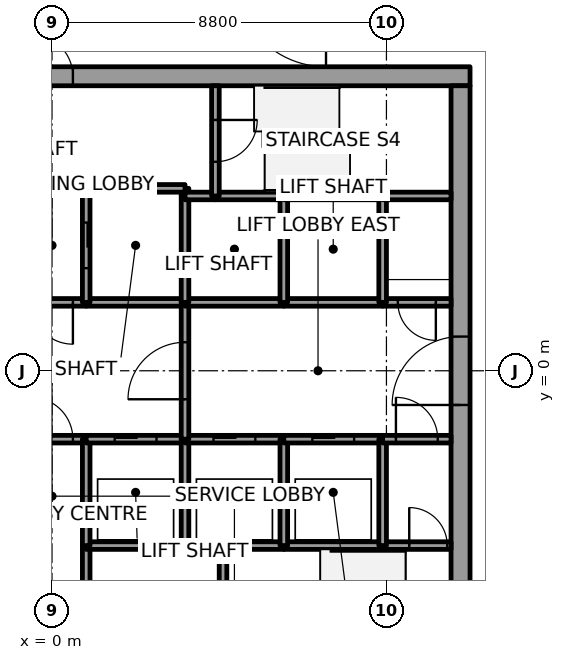
"""IFC4 building model, lengths in metres.
Left out: names, types, materials, properties, quantities, classifications, styles, units other than length and angle.
Written with IfcOpenShell. Run it as: python <this file> out.ifc"""

import sys

from ifc_helpers import new_model, si_unit, direction, frame, frame_2d, origin, place, context, subcontext, project, spatial, rectangle, extrude, element, fill, save


model = new_model("IFC4")
c1 = context("Model", 3, precision=1e-05, world=origin(), true_north=direction((0.0, 1.0)))
c2 = subcontext(c1, "Body", "Model", "MODEL_VIEW")
j1 = project(units=[si_unit("LENGTHUNIT", "METRE"), si_unit("PLANEANGLEUNIT", "RADIAN")], contexts=[c1])
p1 = place(None, origin())
s1 = spatial("IfcSite", under=j1, at=p1, CompositionType="ELEMENT")
p2 = place(p1, origin())
s2 = spatial("IfcBuilding", under=s1, at=p2, CompositionType="ELEMENT")
p3 = place(p2, frame((0.0, 0.0, 107.2)))
s3 = spatial("IfcBuildingStorey", under=s2, at=p3, CompositionType="ELEMENT", Elevation=107.2)
p4 = place(p3, frame((-11.0, 7.75, 0.0), z_axis=(0.0, 0.0, 1.0), x_axis=(1.0, 0.0, 0.0)))
e1 = element("IfcWall", 1, at=p4, inside=s3, PredefinedType="SHEAR", context=c2, shape_type="SweptSolid", body=[
    extrude(rectangle(XDim=22.0, YDim=0.5, at=frame_2d((11.0, 0.0))), origin(), (0.0, 0.0, 1.0), 5.4),
])
p5 = place(p4, frame((10.45, 0.0, 0.0)))
e2 = element("IfcOpeningElement", 2, at=p5, cuts=e1, PredefinedType="OPENING", context=c2, shape_type="SweptSolid", body=[
    extrude(rectangle(XDim=1.1, YDim=2.1, at=frame_2d((0.55, 1.05))), frame((0.0, 0.25, 0.0), z_axis=(0.0, -1.0, 0.0), x_axis=(1.0, 0.0, 0.0)), (0.0, 0.0, 1.0), 0.5),
])
p6 = place(p3, frame((10.75, -7.5, 0.0), z_axis=(0.0, 0.0, 1.0), x_axis=(0.0, 1.0, 0.0)))
e3 = element("IfcWall", 3, at=p6, inside=s3, PredefinedType="SHEAR", context=c2, shape_type="SweptSolid", body=[
    extrude(rectangle(XDim=15.0, YDim=0.5, at=frame_2d((7.5, 0.0))), origin(), (0.0, 0.0, 1.0), 5.4),
])
p7 = place(p6, frame((6.6, 0.0, 0.0)))
e4 = element("IfcOpeningElement", 4, at=p7, cuts=e3, PredefinedType="OPENING", context=c2, shape_type="SweptSolid", body=[
    extrude(rectangle(XDim=1.8, YDim=2.1, at=frame_2d((0.9, 1.05))), frame((0.0, 0.25, 0.0), z_axis=(0.0, -1.0, 0.0), x_axis=(1.0, 0.0, 0.0)), (0.0, 0.0, 1.0), 0.5),
])
p8 = place(p3, frame((-0.9, -1.8, 0.0), z_axis=(0.0, 0.0, 1.0), x_axis=(1.0, 0.0, 0.0)))
e5 = element("IfcWall", 5, at=p8, inside=s3, PredefinedType="SOLIDWALL", context=c2, shape_type="SweptSolid", body=[
    extrude(rectangle(XDim=1.8, YDim=0.2, at=frame_2d((0.9, 0.0))), origin(), (0.0, 0.0, 1.0), 5.25),
])
p9 = place(p8, frame((0.35, 0.0, 0.0)))
e6 = element("IfcOpeningElement", 6, at=p9, cuts=e5, PredefinedType="OPENING", context=c2, shape_type="SweptSolid", body=[
    extrude(rectangle(XDim=1.1, YDim=2.1, at=frame_2d((0.55, 1.05))), frame((0.0, 0.1, 0.0), z_axis=(0.0, -1.0, 0.0), x_axis=(1.0, 0.0, 0.0)), (0.0, 0.0, 1.0), 0.2),
])
p10 = place(p3, frame((0.9, 1.8, 0.0), z_axis=(0.0, 0.0, 1.0), x_axis=(-1.0, 0.0, 0.0)))
e7 = element("IfcWall", 7, at=p10, inside=s3, PredefinedType="SOLIDWALL", context=c2, shape_type="SweptSolid", body=[
    extrude(rectangle(XDim=1.8, YDim=0.2, at=frame_2d((0.9, 0.0))), origin(), (0.0, 0.0, 1.0), 5.25),
])
p11 = place(p10, frame((0.35, 0.0, 0.0)))
e8 = element("IfcOpeningElement", 8, at=p11, cuts=e7, PredefinedType="OPENING", context=c2, shape_type="SweptSolid", body=[
    extrude(rectangle(XDim=1.1, YDim=2.1, at=frame_2d((0.55, 1.05))), frame((0.0, 0.1, 0.0), z_axis=(0.0, -1.0, 0.0), x_axis=(1.0, 0.0, 0.0)), (0.0, 0.0, 1.0), 0.2),
])
p12 = place(p3, frame((0.9, -4.6, 0.0), z_axis=(0.0, 0.0, 1.0), x_axis=(0.0, -1.0, 0.0)))
e9 = element("IfcWall", 9, at=p12, inside=s3, PredefinedType="SOLIDWALL", context=c2, shape_type="SweptSolid", body=[
    extrude(rectangle(XDim=2.9, YDim=0.2, at=frame_2d((1.45, 0.0))), origin(), (0.0, 0.0, 1.0), 5.25),
])
p13 = place(p12, frame((1.0, 0.0, 0.0)))
e10 = element("IfcOpeningElement", 10, at=p13, cuts=e9, PredefinedType="OPENING", context=c2, shape_type="SweptSolid", body=[
    extrude(rectangle(XDim=0.9, YDim=2.1, at=frame_2d((0.45, 1.05))), frame((0.0, 0.1, 0.0), z_axis=(0.0, -1.0, 0.0), x_axis=(1.0, 0.0, 0.0)), (0.0, 0.0, 1.0), 0.2),
])
p14 = place(p3, frame((3.5, -4.6, 0.0), z_axis=(0.0, 0.0, 1.0), x_axis=(-1.0, 0.0, 0.0)))
e11 = element("IfcWall", 11, at=p14, inside=s3, PredefinedType="SOLIDWALL", context=c2, shape_type="SweptSolid", body=[
    extrude(rectangle(XDim=2.6, YDim=0.2, at=frame_2d((1.3, 0.0))), origin(), (0.0, 0.0, 1.0), 5.25),
])
p15 = place(p3, frame((0.9, -1.8, 0.0), z_axis=(0.0, 0.0, 1.0), x_axis=(0.0, -1.0, 0.0)))
e12 = element("IfcWall", 12, at=p15, inside=s3, PredefinedType="SOLIDWALL", context=c2, shape_type="SweptSolid", body=[
    extrude(rectangle(XDim=2.8, YDim=0.2, at=frame_2d((1.4, 0.0))), origin(), (0.0, 0.0, 1.0), 5.25),
])
p16 = place(p3, frame((0.9, -1.8, 0.0), z_axis=(0.0, 0.0, 1.0), x_axis=(1.0, 0.0, 0.0)))
e13 = element("IfcWall", 13, at=p16, inside=s3, PredefinedType="SOLIDWALL", context=c2, shape_type="SweptSolid", body=[
    extrude(rectangle(XDim=2.6, YDim=0.2, at=frame_2d((1.3, 0.0))), origin(), (0.0, 0.0, 1.0), 5.25),
])
p17 = place(p16, frame((0.75, 0.0, 0.0)))
e14 = element("IfcOpeningElement", 14, at=p17, cuts=e13, PredefinedType="OPENING", context=c2, shape_type="SweptSolid", body=[
    extrude(rectangle(XDim=1.1, YDim=2.1, at=frame_2d((0.55, 1.05))), frame((0.0, 0.1, 0.0), z_axis=(0.0, -1.0, 0.0), x_axis=(1.0, 0.0, 0.0)), (0.0, 0.0, 1.0), 0.2),
])
p18 = place(p3, frame((3.5, 1.8, 0.0), z_axis=(0.0, 0.0, 1.0), x_axis=(-1.0, 0.0, 0.0)))
e15 = element("IfcWall", 15, at=p18, inside=s3, PredefinedType="SOLIDWALL", context=c2, shape_type="SweptSolid", body=[
    extrude(rectangle(XDim=2.6, YDim=0.2, at=frame_2d((1.3, 0.0))), origin(), (0.0, 0.0, 1.0), 5.25),
])
p19 = place(p3, frame((3.5, 4.6, 0.0), z_axis=(0.0, 0.0, 1.0), x_axis=(0.0, 1.0, 0.0)))
e16 = element("IfcWall", 16, at=p19, inside=s3, PredefinedType="SOLIDWALL", context=c2, shape_type="SweptSolid", body=[
    extrude(rectangle(XDim=0.2, YDim=0.2, at=frame_2d((0.1, 0.0))), origin(), (0.0, 0.0, 1.0), 5.25),
])
p20 = place(p3, frame((3.5, 4.8, 0.0), z_axis=(0.0, 0.0, 1.0), x_axis=(-1.0, 0.0, 0.0)))
e17 = element("IfcWall", 17, at=p20, inside=s3, PredefinedType="SOLIDWALL", context=c2, shape_type="SweptSolid", body=[
    extrude(rectangle(XDim=2.6, YDim=0.2, at=frame_2d((1.3, 0.0))), origin(), (0.0, 0.0, 1.0), 5.25),
])
p21 = place(p3, frame((0.9, 4.8, 0.0), z_axis=(0.0, 0.0, 1.0), x_axis=(0.0, -1.0, 0.0)))
e18 = element("IfcWall", 18, at=p21, inside=s3, PredefinedType="SOLIDWALL", context=c2, shape_type="SweptSolid", body=[
    extrude(rectangle(XDim=3.0, YDim=0.2, at=frame_2d((1.5, 0.0))), origin(), (0.0, 0.0, 1.0), 5.25),
])
p22 = place(p21, frame((0.9, 0.0, 0.0)))
e19 = element("IfcOpeningElement", 19, at=p22, cuts=e18, PredefinedType="OPENING", context=c2, shape_type="SweptSolid", body=[
    extrude(rectangle(XDim=1.2, YDim=2.1, at=frame_2d((0.6, 1.05))), frame((0.0, 0.1, 0.0), z_axis=(0.0, -1.0, 0.0), x_axis=(1.0, 0.0, 0.0)), (0.0, 0.0, 1.0), 0.2),
])
p23 = place(p3, frame((4.5, -4.6, 0.0), z_axis=(0.0, 0.0, 1.0), x_axis=(-1.0, 0.0, 0.0)))
e20 = element("IfcWall", 20, at=p23, inside=s3, PredefinedType="SOLIDWALL", context=c2, shape_type="SweptSolid", body=[
    extrude(rectangle(XDim=1.0, YDim=0.2, at=frame_2d((0.5, 0.0))), origin(), (0.0, 0.0, 1.0), 5.25),
])
p24 = place(p3, frame((3.5, -4.6, 0.0), z_axis=(0.0, 0.0, 1.0), x_axis=(0.0, 1.0, 0.0)))
e21 = element("IfcWall", 21, at=p24, inside=s3, PredefinedType="SOLIDWALL", context=c2, shape_type="SweptSolid", body=[
    extrude(rectangle(XDim=2.8, YDim=0.2, at=frame_2d((1.4, 0.0))), origin(), (0.0, 0.0, 1.0), 5.25),
])
p25 = place(p3, frame((3.5, -1.8, 0.0), z_axis=(0.0, 0.0, 1.0), x_axis=(1.0, 0.0, 0.0)))
e22 = element("IfcWall", 22, at=p25, inside=s3, PredefinedType="SOLIDWALL", context=c2, shape_type="SweptSolid", body=[
    extrude(rectangle(XDim=2.6, YDim=0.2, at=frame_2d((1.3, 0.0))), origin(), (0.0, 0.0, 1.0), 5.25),
])
p26 = place(p25, frame((0.75, 0.0, 0.0)))
e23 = element("IfcOpeningElement", 23, at=p26, cuts=e22, PredefinedType="OPENING", context=c2, shape_type="SweptSolid", body=[
    extrude(rectangle(XDim=1.1, YDim=2.1, at=frame_2d((0.55, 1.05))), frame((0.0, 0.1, 0.0), z_axis=(0.0, -1.0, 0.0), x_axis=(1.0, 0.0, 0.0)), (0.0, 0.0, 1.0), 0.2),
])
p27 = place(p3, frame((3.5, -1.8, 0.0), z_axis=(0.0, 0.0, 1.0), x_axis=(0.0, 1.0, 0.0)))
e24 = element("IfcWall", 24, at=p27, inside=s3, PredefinedType="SOLIDWALL", context=c2, shape_type="SweptSolid", body=[
    extrude(rectangle(XDim=3.6, YDim=0.2, at=frame_2d((1.8, 0.0))), origin(), (0.0, 0.0, 1.0), 5.25),
])
p28 = place(p27, frame((1.05, 0.0, 0.0)))
e25 = element("IfcOpeningElement", 25, at=p28, cuts=e24, PredefinedType="OPENING", context=c2, shape_type="SweptSolid", body=[
    extrude(rectangle(XDim=1.5, YDim=2.1, at=frame_2d((0.75, 1.05))), frame((0.0, 0.1, 0.0), z_axis=(0.0, -1.0, 0.0), x_axis=(1.0, 0.0, 0.0)), (0.0, 0.0, 1.0), 0.2),
])
p29 = place(p3, frame((6.1, 1.8, 0.0), z_axis=(0.0, 0.0, 1.0), x_axis=(-1.0, 0.0, 0.0)))
e26 = element("IfcWall", 26, at=p29, inside=s3, PredefinedType="SOLIDWALL", context=c2, shape_type="SweptSolid", body=[
    extrude(rectangle(XDim=2.6, YDim=0.2, at=frame_2d((1.3, 0.0))), origin(), (0.0, 0.0, 1.0), 5.25),
])
p30 = place(p3, frame((3.5, 1.8, 0.0), z_axis=(0.0, 0.0, 1.0), x_axis=(0.0, 1.0, 0.0)))
e27 = element("IfcWall", 27, at=p30, inside=s3, PredefinedType="SOLIDWALL", context=c2, shape_type="SweptSolid", body=[
    extrude(rectangle(XDim=2.8, YDim=0.2, at=frame_2d((1.4, 0.0))), origin(), (0.0, 0.0, 1.0), 5.25),
])
p31 = place(p3, frame((4.3, 4.6, 0.0), z_axis=(0.0, 0.0, 1.0), x_axis=(-1.0, 0.0, 0.0)))
e28 = element("IfcWall", 28, at=p31, inside=s3, PredefinedType="SOLIDWALL", context=c2, shape_type="SweptSolid", body=[
    extrude(rectangle(XDim=0.8, YDim=0.2, at=frame_2d((0.4, 0.0))), origin(), (0.0, 0.0, 1.0), 5.25),
])
p32 = place(p3, frame((6.1, 4.6, 0.0), z_axis=(0.0, 0.0, 1.0), x_axis=(-1.0, 0.0, 0.0)))
e29 = element("IfcWall", 29, at=p32, inside=s3, PredefinedType="SOLIDWALL", context=c2, shape_type="SweptSolid", body=[
    extrude(rectangle(XDim=1.8, YDim=0.2, at=frame_2d((0.9, 0.0))), origin(), (0.0, 0.0, 1.0), 5.25),
])
p33 = place(p3, frame((4.3, 7.5, 0.0), z_axis=(0.0, 0.0, 1.0), x_axis=(0.0, -1.0, 0.0)))
e30 = element("IfcWall", 30, at=p33, inside=s3, PredefinedType="SOLIDWALL", context=c2, shape_type="SweptSolid", body=[
    extrude(rectangle(XDim=2.9, YDim=0.2, at=frame_2d((1.45, 0.0))), origin(), (0.0, 0.0, 1.0), 5.25),
])
p34 = place(p33, frame((0.9, 0.0, 0.0)))
e31 = element("IfcOpeningElement", 31, at=p34, cuts=e30, PredefinedType="OPENING", context=c2, shape_type="SweptSolid", body=[
    extrude(rectangle(XDim=1.1, YDim=2.1, at=frame_2d((0.55, 1.05))), frame((0.0, 0.1, 0.0), z_axis=(0.0, -1.0, 0.0), x_axis=(1.0, 0.0, 0.0)), (0.0, 0.0, 1.0), 0.2),
])
p35 = place(p3, frame((4.5, -7.5, 0.0), z_axis=(0.0, 0.0, 1.0), x_axis=(0.0, 1.0, 0.0)))
e32 = element("IfcWall", 32, at=p35, inside=s3, PredefinedType="SOLIDWALL", context=c2, shape_type="SweptSolid", body=[
    extrude(rectangle(XDim=2.9, YDim=0.2, at=frame_2d((1.45, 0.0))), origin(), (0.0, 0.0, 1.0), 5.25),
])
p36 = place(p3, frame((4.5, -4.6, 0.0), z_axis=(0.0, 0.0, 1.0), x_axis=(1.0, 0.0, 0.0)))
e33 = element("IfcWall", 33, at=p36, inside=s3, PredefinedType="SOLIDWALL", context=c2, shape_type="SweptSolid", body=[
    extrude(rectangle(XDim=1.6, YDim=0.2, at=frame_2d((0.8, 0.0))), origin(), (0.0, 0.0, 1.0), 5.25),
])
p37 = place(p3, frame((6.1, -4.6, 0.0), z_axis=(0.0, 0.0, 1.0), x_axis=(1.0, 0.0, 0.0)))
e34 = element("IfcWall", 34, at=p37, inside=s3, PredefinedType="SOLIDWALL", context=c2, shape_type="SweptSolid", body=[
    extrude(rectangle(XDim=2.6, YDim=0.2, at=frame_2d((1.3, 0.0))), origin(), (0.0, 0.0, 1.0), 5.25),
])
p38 = place(p3, frame((6.1, -4.6, 0.0), z_axis=(0.0, 0.0, 1.0), x_axis=(0.0, 1.0, 0.0)))
e35 = element("IfcWall", 35, at=p38, inside=s3, PredefinedType="SOLIDWALL", context=c2, shape_type="SweptSolid", body=[
    extrude(rectangle(XDim=2.8, YDim=0.2, at=frame_2d((1.4, 0.0))), origin(), (0.0, 0.0, 1.0), 5.25),
])
p39 = place(p3, frame((6.1, -1.8, 0.0), z_axis=(0.0, 0.0, 1.0), x_axis=(1.0, 0.0, 0.0)))
e36 = element("IfcWall", 36, at=p39, inside=s3, PredefinedType="SOLIDWALL", context=c2, shape_type="SweptSolid", body=[
    extrude(rectangle(XDim=2.6, YDim=0.2, at=frame_2d((1.3, 0.0))), origin(), (0.0, 0.0, 1.0), 5.25),
])
p40 = place(p39, frame((0.75, 0.0, 0.0)))
e37 = element("IfcOpeningElement", 37, at=p40, cuts=e36, PredefinedType="OPENING", context=c2, shape_type="SweptSolid", body=[
    extrude(rectangle(XDim=1.1, YDim=2.1, at=frame_2d((0.55, 1.05))), frame((0.0, 0.1, 0.0), z_axis=(0.0, -1.0, 0.0), x_axis=(1.0, 0.0, 0.0)), (0.0, 0.0, 1.0), 0.2),
])
p41 = place(p3, frame((8.7, 1.8, 0.0), z_axis=(0.0, 0.0, 1.0), x_axis=(-1.0, 0.0, 0.0)))
e38 = element("IfcWall", 38, at=p41, inside=s3, PredefinedType="SOLIDWALL", context=c2, shape_type="SweptSolid", body=[
    extrude(rectangle(XDim=2.6, YDim=0.2, at=frame_2d((1.3, 0.0))), origin(), (0.0, 0.0, 1.0), 5.25),
])
p42 = place(p3, frame((6.1, 1.8, 0.0), z_axis=(0.0, 0.0, 1.0), x_axis=(0.0, 1.0, 0.0)))
e39 = element("IfcWall", 39, at=p42, inside=s3, PredefinedType="SOLIDWALL", context=c2, shape_type="SweptSolid", body=[
    extrude(rectangle(XDim=2.8, YDim=0.2, at=frame_2d((1.4, 0.0))), origin(), (0.0, 0.0, 1.0), 5.25),
])
p43 = place(p3, frame((8.7, 4.6, 0.0), z_axis=(0.0, 0.0, 1.0), x_axis=(-1.0, 0.0, 0.0)))
e40 = element("IfcWall", 40, at=p43, inside=s3, PredefinedType="SOLIDWALL", context=c2, shape_type="SweptSolid", body=[
    extrude(rectangle(XDim=2.6, YDim=0.2, at=frame_2d((1.3, 0.0))), origin(), (0.0, 0.0, 1.0), 5.25),
])
p44 = place(p3, frame((8.7, -4.6, 0.0), z_axis=(0.0, 0.0, 1.0), x_axis=(1.0, 0.0, 0.0)))
e41 = element("IfcWall", 41, at=p44, inside=s3, PredefinedType="SOLIDWALL", context=c2, shape_type="SweptSolid", body=[
    extrude(rectangle(XDim=1.8, YDim=0.2, at=frame_2d((0.9, 0.0))), origin(), (0.0, 0.0, 1.0), 5.25),
])
p45 = place(p44, frame((0.7, 0.0, 0.0)))
e42 = element("IfcOpeningElement", 42, at=p45, cuts=e41, PredefinedType="OPENING", context=c2, shape_type="SweptSolid", body=[
    extrude(rectangle(XDim=1.0, YDim=2.1, at=frame_2d((0.5, 1.05))), frame((0.0, 0.1, 0.0), z_axis=(0.0, -1.0, 0.0), x_axis=(1.0, 0.0, 0.0)), (0.0, 0.0, 1.0), 0.2),
])
p46 = place(p3, frame((8.7, -1.8, 0.0), z_axis=(0.0, 0.0, 1.0), x_axis=(0.0, -1.0, 0.0)))
e43 = element("IfcWall", 43, at=p46, inside=s3, PredefinedType="SOLIDWALL", context=c2, shape_type="SweptSolid", body=[
    extrude(rectangle(XDim=2.8, YDim=0.2, at=frame_2d((1.4, 0.0))), origin(), (0.0, 0.0, 1.0), 5.25),
])
p47 = place(p3, frame((8.7, -1.8, 0.0), z_axis=(0.0, 0.0, 1.0), x_axis=(1.0, 0.0, 0.0)))
e44 = element("IfcWall", 44, at=p47, inside=s3, PredefinedType="SOLIDWALL", context=c2, shape_type="SweptSolid", body=[
    extrude(rectangle(XDim=1.8, YDim=0.2, at=frame_2d((0.9, 0.0))), origin(), (0.0, 0.0, 1.0), 5.25),
])
p48 = place(p47, frame((0.35, 0.0, 0.0)))
e45 = element("IfcOpeningElement", 45, at=p48, cuts=e44, PredefinedType="OPENING", context=c2, shape_type="SweptSolid", body=[
    extrude(rectangle(XDim=1.1, YDim=2.1, at=frame_2d((0.55, 1.05))), frame((0.0, 0.1, 0.0), z_axis=(0.0, -1.0, 0.0), x_axis=(1.0, 0.0, 0.0)), (0.0, 0.0, 1.0), 0.2),
])
p49 = place(p3, frame((10.5, 1.8, 0.0), z_axis=(0.0, 0.0, 1.0), x_axis=(-1.0, 0.0, 0.0)))
e46 = element("IfcWall", 46, at=p49, inside=s3, PredefinedType="SOLIDWALL", context=c2, shape_type="SweptSolid", body=[
    extrude(rectangle(XDim=1.8, YDim=0.2, at=frame_2d((0.9, 0.0))), origin(), (0.0, 0.0, 1.0), 5.25),
])
p50 = place(p49, frame((0.4, 0.0, 0.0)))
e47 = element("IfcOpeningElement", 47, at=p50, cuts=e46, PredefinedType="OPENING", context=c2, shape_type="SweptSolid", body=[
    extrude(rectangle(XDim=1.0, YDim=2.1, at=frame_2d((0.5, 1.05))), frame((0.0, 0.1, 0.0), z_axis=(0.0, -1.0, 0.0), x_axis=(1.0, 0.0, 0.0)), (0.0, 0.0, 1.0), 0.2),
])
p51 = place(p3, frame((8.7, 4.6, 0.0), z_axis=(0.0, 0.0, 1.0), x_axis=(0.0, -1.0, 0.0)))
e48 = element("IfcWall", 48, at=p51, inside=s3, PredefinedType="SOLIDWALL", context=c2, shape_type="SweptSolid", body=[
    extrude(rectangle(XDim=2.8, YDim=0.2, at=frame_2d((1.4, 0.0))), origin(), (0.0, 0.0, 1.0), 5.25),
])
p52 = place(p3, frame((10.5, 4.6, 0.0), z_axis=(0.0, 0.0, 1.0), x_axis=(-1.0, 0.0, 0.0)))
e49 = element("IfcWall", 49, at=p52, inside=s3, PredefinedType="SOLIDWALL", context=c2, shape_type="SweptSolid", body=[
    extrude(rectangle(XDim=1.8, YDim=0.2, at=frame_2d((0.9, 0.0))), origin(), (0.0, 0.0, 1.0), 5.25),
])
p53 = place(p17, origin())
e50 = element("IfcDoor", 50, at=p53, inside=s3, OperationType="SLIDING_TO_RIGHT", PredefinedType="DOOR", context=c2, shape_type="SweptSolid", body=[
    extrude(rectangle(XDim=1.1, YDim=2.1, at=frame_2d((0.55, 1.05))), frame((0.0, 0.025, 0.0), z_axis=(0.0, -1.0, 0.0), x_axis=(1.0, 0.0, 0.0)), (0.0, 0.0, 1.0), 0.05),
])
fill(e14, e50)
p54 = place(p26, origin())
e51 = element("IfcDoor", 51, at=p54, inside=s3, OperationType="SLIDING_TO_LEFT", PredefinedType="DOOR", context=c2, shape_type="SweptSolid", body=[
    extrude(rectangle(XDim=1.1, YDim=2.1, at=frame_2d((0.55, 1.05))), frame((0.0, 0.025, 0.0), z_axis=(0.0, -1.0, 0.0), x_axis=(1.0, 0.0, 0.0)), (0.0, 0.0, 1.0), 0.05),
])
fill(e23, e51)
p55 = place(p40, origin())
e52 = element("IfcDoor", 52, at=p55, inside=s3, OperationType="SLIDING_TO_RIGHT", PredefinedType="DOOR", context=c2, shape_type="SweptSolid", body=[
    extrude(rectangle(XDim=1.1, YDim=2.1, at=frame_2d((0.55, 1.05))), frame((0.0, 0.025, 0.0), z_axis=(0.0, -1.0, 0.0), x_axis=(1.0, 0.0, 0.0)), (0.0, 0.0, 1.0), 0.05),
])
fill(e37, e52)
p56 = place(p22, origin())
e53 = element("IfcDoor", 53, at=p56, inside=s3, OperationType="SLIDING_TO_LEFT", PredefinedType="DOOR", context=c2, shape_type="SweptSolid", body=[
    extrude(rectangle(XDim=1.2, YDim=2.1, at=frame_2d((0.6, 1.05))), frame((0.0, 0.025, 0.0), z_axis=(0.0, -1.0, 0.0), x_axis=(1.0, 0.0, 0.0)), (0.0, 0.0, 1.0), 0.05),
])
fill(e19, e53)
p57 = place(p28, origin())
e54 = element("IfcDoor", 54, at=p57, inside=s3, OperationType="DOUBLE_DOOR_SINGLE_SWING", PredefinedType="DOOR", context=c2, shape_type="SweptSolid", body=[
    extrude(rectangle(XDim=1.5, YDim=2.1, at=frame_2d((0.75, 1.05))), frame((0.0, 0.025, 0.0), z_axis=(0.0, -1.0, 0.0), x_axis=(1.0, 0.0, 0.0)), (0.0, 0.0, 1.0), 0.05),
])
fill(e25, e54)
p58 = place(p48, origin())
e55 = element("IfcDoor", 55, at=p58, inside=s3, OperationType="SINGLE_SWING_RIGHT", PredefinedType="DOOR", context=c2, shape_type="SweptSolid", body=[
    extrude(rectangle(XDim=1.1, YDim=2.1, at=frame_2d((0.55, 1.05))), frame((0.0, 0.025, 0.0), z_axis=(0.0, -1.0, 0.0), x_axis=(1.0, 0.0, 0.0)), (0.0, 0.0, 1.0), 0.05),
])
fill(e45, e55)
p59 = place(p11, origin())
e56 = element("IfcDoor", 56, at=p59, inside=s3, OperationType="SINGLE_SWING_LEFT", PredefinedType="DOOR", context=c2, shape_type="SweptSolid", body=[
    extrude(rectangle(XDim=1.1, YDim=2.1, at=frame_2d((0.55, 1.05))), frame((0.0, 0.025, 0.0), z_axis=(0.0, -1.0, 0.0), x_axis=(1.0, 0.0, 0.0)), (0.0, 0.0, 1.0), 0.05),
])
fill(e8, e56)
p60 = place(p9, origin())
e57 = element("IfcDoor", 57, at=p60, inside=s3, OperationType="SINGLE_SWING_LEFT", PredefinedType="DOOR", context=c2, shape_type="SweptSolid", body=[
    extrude(rectangle(XDim=1.1, YDim=2.1, at=frame_2d((0.55, 1.05))), frame((0.0, 0.025, 0.0), z_axis=(0.0, -1.0, 0.0), x_axis=(1.0, 0.0, 0.0)), (0.0, 0.0, 1.0), 0.05),
])
fill(e6, e57)
p61 = place(p50, origin())
e58 = element("IfcDoor", 58, at=p61, inside=s3, OperationType="SINGLE_SWING_RIGHT", PredefinedType="DOOR", context=c2, shape_type="SweptSolid", body=[
    extrude(rectangle(XDim=1.0, YDim=2.1, at=frame_2d((0.5, 1.05))), frame((0.0, 0.025, 0.0), z_axis=(0.0, -1.0, 0.0), x_axis=(1.0, 0.0, 0.0)), (0.0, 0.0, 1.0), 0.05),
])
fill(e47, e58)
p62 = place(p45, origin())
e59 = element("IfcDoor", 59, at=p62, inside=s3, OperationType="SINGLE_SWING_RIGHT", PredefinedType="DOOR", context=c2, shape_type="SweptSolid", body=[
    extrude(rectangle(XDim=1.0, YDim=2.1, at=frame_2d((0.5, 1.05))), frame((0.0, 0.025, 0.0), z_axis=(0.0, -1.0, 0.0), x_axis=(1.0, 0.0, 0.0)), (0.0, 0.0, 1.0), 0.05),
])
fill(e42, e59)
p63 = place(p34, origin())
e60 = element("IfcDoor", 60, at=p63, inside=s3, OperationType="SINGLE_SWING_LEFT", PredefinedType="DOOR", context=c2, shape_type="SweptSolid", body=[
    extrude(rectangle(XDim=1.1, YDim=2.1, at=frame_2d((0.55, 1.05))), frame((0.0, 0.025, 0.0), z_axis=(0.0, -1.0, 0.0), x_axis=(1.0, 0.0, 0.0)), (0.0, 0.0, 1.0), 0.05),
])
fill(e31, e60)
p64 = place(p7, origin())
e61 = element("IfcDoor", 61, at=p64, inside=s3, OperationType="DOUBLE_DOOR_SINGLE_SWING", PredefinedType="DOOR", context=c2, shape_type="SweptSolid", body=[
    extrude(rectangle(XDim=1.8, YDim=2.1, at=frame_2d((0.9, 1.05))), frame((0.0, 0.025, 0.0), z_axis=(0.0, -1.0, 0.0), x_axis=(1.0, 0.0, 0.0)), (0.0, 0.0, 1.0), 0.05),
])
fill(e4, e61)
p65 = place(p5, origin())
e62 = element("IfcDoor", 62, at=p65, inside=s3, OperationType="SINGLE_SWING_RIGHT", PredefinedType="DOOR", context=c2, shape_type="SweptSolid", body=[
    extrude(rectangle(XDim=1.1, YDim=2.1, at=frame_2d((0.55, 1.05))), frame((0.0, 0.025, 0.0), z_axis=(0.0, -1.0, 0.0), x_axis=(1.0, 0.0, 0.0)), (0.0, 0.0, 1.0), 0.05),
])
fill(e2, e62)
save(model, sys.argv[1])
